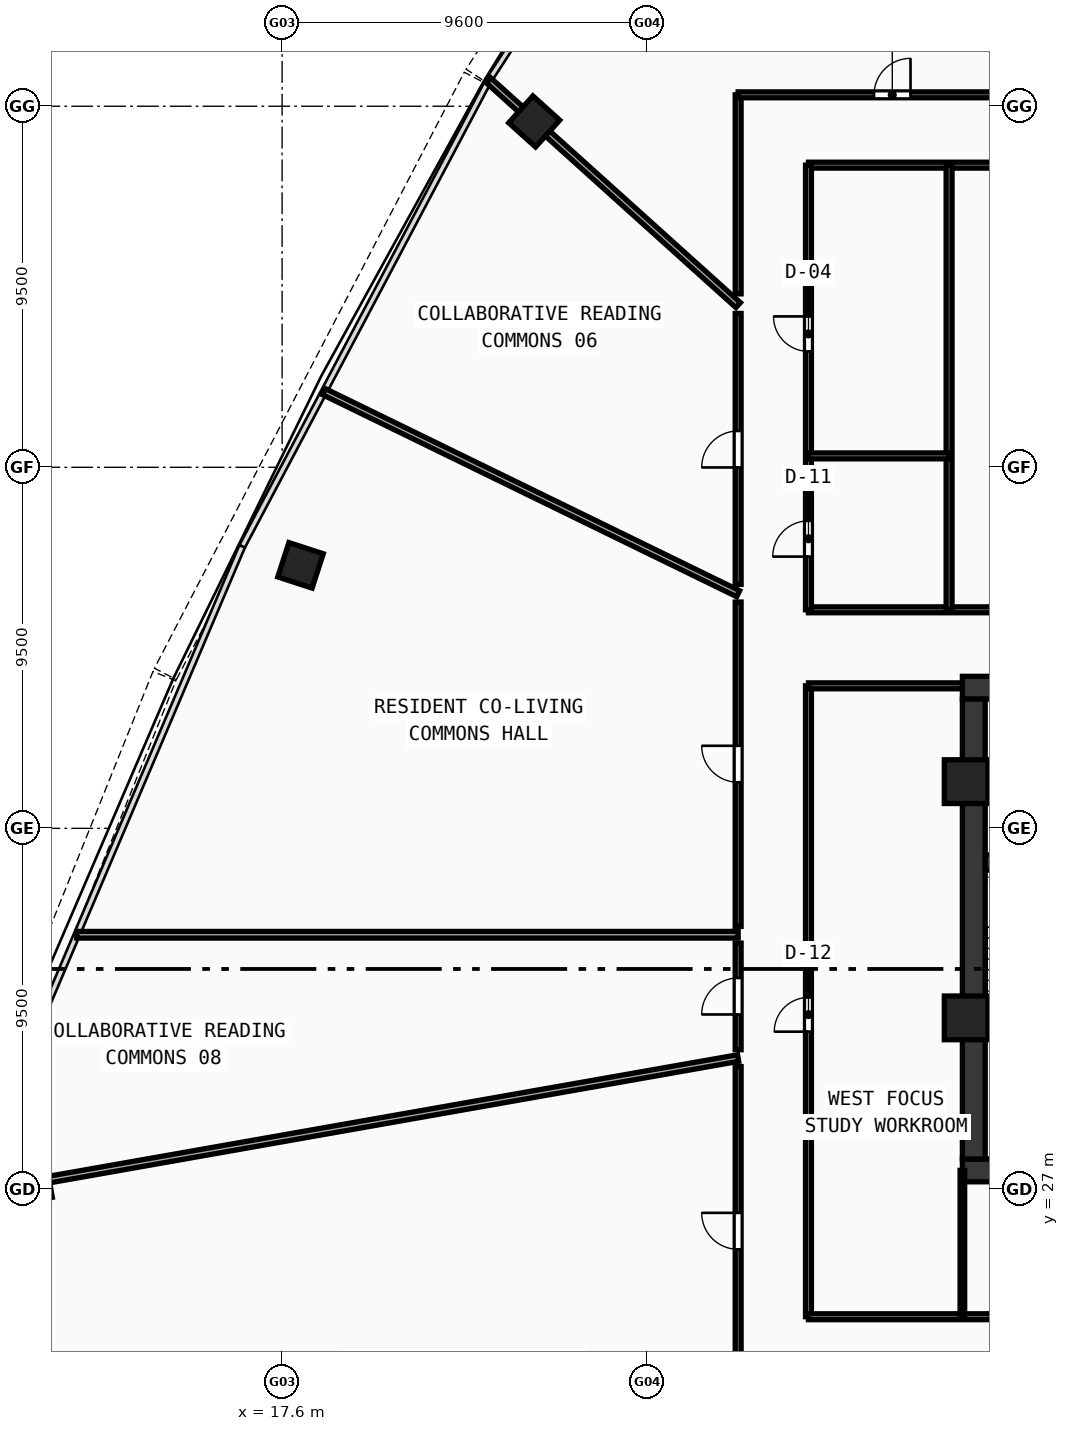
"""IFC4 building model, lengths in metres.
Left out: names, types, materials, properties, quantities, classifications, styles, units other than length and angle.
Written with IfcOpenShell. Run it as: python <this file> out.ifc"""

import sys

from ifc_helpers import new_model, si_unit, direction, frame, frame_2d, origin, origin_with_axes, origin_2d, place, context, subcontext, project, spatial, rectangle, hollow_rectangle, extrude, source, transform, mapped, element, fill, save


model = new_model("IFC4")
c1 = context("Model", 3, precision=1e-05, world=origin(), true_north=direction((0.0, 1.0)))
c2 = subcontext(c1, "Body", "Model", "MODEL_VIEW")
j1 = project(units=[si_unit("LENGTHUNIT", "METRE"), si_unit("PLANEANGLEUNIT", "RADIAN")], contexts=[c1])
p1 = place(None, origin())
s1 = spatial("IfcSite", under=j1, at=p1, CompositionType="ELEMENT")
p2 = place(p1, origin())
s2 = spatial("IfcBuilding", under=s1, at=p2, CompositionType="ELEMENT")
p3 = place(p2, frame((0.0, 0.0, 140.87)))
s3 = spatial("IfcBuildingStorey", under=s2, at=p3, CompositionType="ELEMENT", Elevation=140.87)
p4 = place(p3, frame((35.5, 27.5, 0.0), z_axis=(0.0, 0.0, 1.0), x_axis=(1.0, 0.0, 0.0)))
e1 = element("IfcWall", 1, at=p4, inside=s3, PredefinedType="SHEAR", context=c2, shape_type="SweptSolid", body=[
    extrude(rectangle(XDim=25.0, YDim=0.6, at=frame_2d((12.5, 0.0))), origin(), (0.0, 0.0, 1.0), 3.42),
])
p5 = place(p3, frame((35.5, 40.2, 0.0), z_axis=(0.0, 0.0, 1.0), x_axis=(1.0, 0.0, 0.0)))
e2 = element("IfcWall", 2, at=p5, inside=s3, PredefinedType="SHEAR", context=c2, shape_type="SweptSolid", body=[
    extrude(rectangle(XDim=11.3, YDim=0.6, at=frame_2d((5.65, 0.0))), origin(), (0.0, 0.0, 1.0), 3.42),
])
p6 = place(p5, frame((1.65, 0.0, 0.0)))
e3 = element("IfcOpeningElement", 3, at=p6, cuts=e2, PredefinedType="OPENING", context=c2, shape_type="SweptSolid", body=[
    extrude(rectangle(XDim=1.05, YDim=2.1, at=frame_2d((0.525, 1.05))), frame((0.0, 0.31, 0.0), z_axis=(0.0, -1.0, 0.0), x_axis=(1.0, 0.0, 0.0)), (0.0, 0.0, 1.0), 0.62),
])
p7 = place(p3, frame((35.8, 27.8, 0.0), z_axis=(0.0, 0.0, 1.0), x_axis=(0.0, 1.0, 0.0)))
e4 = element("IfcWall", 4, at=p7, inside=s3, PredefinedType="SHEAR", context=c2, shape_type="SweptSolid", body=[
    extrude(rectangle(XDim=12.1, YDim=0.6, at=frame_2d((6.05, 0.0))), origin(), (0.0, 0.0, 1.0), 3.42),
])
p8 = place(p3, frame((36.1, 35.6, 0.0), z_axis=(0.0, 0.0, 1.0), x_axis=(1.0, 0.0, 0.0)))
e5 = element("IfcWall", 5, at=p8, inside=s3, PredefinedType="SHEAR", context=c2, shape_type="SweptSolid", body=[
    extrude(rectangle(XDim=3.1, YDim=0.4, at=frame_2d((1.55, 0.0))), origin(), (0.0, 0.0, 1.0), 3.42),
])
p9 = place(p8, frame((1.02, 0.0, 0.0)))
e6 = element("IfcOpeningElement", 6, at=p9, cuts=e5, PredefinedType="OPENING", context=c2, shape_type="SweptSolid", body=[
    extrude(rectangle(XDim=1.05, YDim=2.1, at=frame_2d((0.525, 1.05))), frame((0.0, 0.21, 0.0), z_axis=(0.0, -1.0, 0.0), x_axis=(1.0, 0.0, 0.0)), (0.0, 0.0, 1.0), 0.42),
])
m1 = source(origin(), c2, "Body", "SweptSolid", [
    extrude(hollow_rectangle(XDim=1.15, YDim=1.15, WallThickness=0.048, at=origin_2d()), origin(), (0.0, 0.0, 1.0), 3.68),
])
for number, where, z_axis, x_axis in (
    (7, (35.6, 37.729, -0.26), (0.0, 0.0, 1.0), (1.0, 0.0, 0.0)),
    (8, (35.6, 31.513, -0.26), (0.0, 0.0, 1.0), (1.0, 0.0, 0.0)),
):
    element("IfcColumn", number, at=place(p3, frame(where, z_axis=z_axis, x_axis=x_axis)), inside=s3, PredefinedType="COLUMN", context=c2, shape_type="MappedRepresentation", body=[
        mapped(m1, transform((0.0, 0.0, 0.0), scale=1.0)),
    ])
m2 = source(origin(), c2, "Body", "SweptSolid", [
    extrude(hollow_rectangle(XDim=0.95, YDim=0.95, WallThickness=0.04, at=origin_2d()), origin(), (0.0, 0.0, 1.0), 3.68),
])
for number, where, z_axis, x_axis in (
    (9, (24.234, 55.099, -0.26), (0.0, 0.0, 1.0), (-0.669, -0.743, 0.0)),
    (10, (18.085, 43.42, -0.26), (0.0, 0.0, 1.0), (-0.309, -0.951, 0.0)),
    (11, (11.003, 27.177, -0.26), (0.0, 0.0, 1.0), (0.174, -0.985, 0.0)),
):
    element("IfcColumn", number, at=place(p3, frame(where, z_axis=z_axis, x_axis=x_axis)), inside=s3, PredefinedType="COLUMN", context=c2, shape_type="MappedRepresentation", body=[
        mapped(m2, transform((0.0, 0.0, 0.0), scale=1.0)),
    ])
p10 = place(p3, frame((8.102, 24.038, 0.0), z_axis=(0.0, 0.0, 1.0), x_axis=(0.497915888941, -0.867225326856, 0.0)))
e12 = element("IfcWall", 12, at=p10, inside=s3, PredefinedType="STANDARD", context=c2, shape_type="SweptSolid", body=[
    extrude(rectangle(XDim=8.858, YDim=0.26, at=frame_2d((4.429, 0.0))), origin(), (0.0, 0.0, 1.0), 3.42),
])
p11 = place(p10, frame((3.529, 0.0, 0.0)))
e13 = element("IfcOpeningElement", 13, at=p11, cuts=e12, PredefinedType="OPENING", context=c2, shape_type="SweptSolid", body=[
    extrude(rectangle(XDim=1.8, YDim=2.15, at=frame_2d((0.9, 1.075))), frame((0.0, 0.14, 0.0), z_axis=(0.0, -1.0, 0.0), x_axis=(1.0, 0.0, 0.0)), (0.0, 0.0, 1.0), 0.28),
])
p12 = place(p3, frame((31.45, 42.25, 0.0), z_axis=(0.0, 0.0, 1.0), x_axis=(1.0, 0.0, 0.0)))
e14 = element("IfcWall", 14, at=p12, inside=s3, PredefinedType="PARTITIONING", context=c2, shape_type="SweptSolid", body=[
    extrude(rectangle(XDim=33.1, YDim=0.155, at=frame_2d((16.55, 0.0))), origin(), (0.0, 0.0, 1.0), 2.77),
])
p13 = place(p3, frame((31.45, 53.95, 0.0), z_axis=(0.0, 0.0, 1.0), x_axis=(1.0, 0.0, 0.0)))
e15 = element("IfcWall", 15, at=p13, inside=s3, PredefinedType="PARTITIONING", context=c2, shape_type="SweptSolid", body=[
    extrude(rectangle(XDim=33.1, YDim=0.155, at=frame_2d((16.55, 0.0))), origin(), (0.0, 0.0, 1.0), 2.77),
])
p14 = place(p13, frame((8.0, 0.0, 0.0)))
e16 = element("IfcOpeningElement", 16, at=p14, cuts=e15, PredefinedType="OPENING", context=c2, shape_type="SweptSolid", body=[
    extrude(rectangle(XDim=0.92, YDim=2.1, at=frame_2d((0.46, 1.05))), frame((0.0, 0.087, 0.0), z_axis=(0.0, -1.0, 0.0), x_axis=(1.0, 0.0, 0.0)), (0.0, 0.0, 1.0), 0.175),
])
p15 = place(p13, frame((25.05, 0.0, 0.0)))
e17 = element("IfcOpeningElement", 17, at=p15, cuts=e15, PredefinedType="OPENING", context=c2, shape_type="SweptSolid", body=[
    extrude(rectangle(XDim=0.92, YDim=2.1, at=frame_2d((0.46, 1.05))), frame((0.0, 0.087, 0.0), z_axis=(0.0, -1.0, 0.0), x_axis=(1.0, 0.0, 0.0)), (0.0, 0.0, 1.0), 0.175),
])
p16 = place(p3, frame((31.45, 42.25, 0.0), z_axis=(0.0, 0.0, 1.0), x_axis=(0.0, 1.0, 0.0)))
e18 = element("IfcWall", 18, at=p16, inside=s3, PredefinedType="PARTITIONING", context=c2, shape_type="SweptSolid", body=[
    extrude(rectangle(XDim=11.7, YDim=0.155, at=frame_2d((5.85, 0.0))), origin(), (0.0, 0.0, 1.0), 2.77),
])
p17 = place(p16, frame((1.4, 0.0, 0.0)))
e19 = element("IfcOpeningElement", 19, at=p17, cuts=e18, PredefinedType="OPENING", context=c2, shape_type="SweptSolid", body=[
    extrude(rectangle(XDim=0.94, YDim=2.1, at=frame_2d((0.47, 1.05))), frame((0.0, 0.087, 0.0), z_axis=(0.0, -1.0, 0.0), x_axis=(1.0, 0.0, 0.0)), (0.0, 0.0, 1.0), 0.175),
])
p18 = place(p16, frame((6.8, 0.0, 0.0)))
e20 = element("IfcOpeningElement", 20, at=p18, cuts=e18, PredefinedType="OPENING", context=c2, shape_type="SweptSolid", body=[
    extrude(rectangle(XDim=0.92, YDim=2.1, at=frame_2d((0.46, 1.05))), frame((0.0, 0.087, 0.0), z_axis=(0.0, -1.0, 0.0), x_axis=(1.0, 0.0, 0.0)), (0.0, 0.0, 1.0), 0.175),
])
p19 = place(p3, frame((35.15, 42.25, 0.0), z_axis=(0.0, 0.0, 1.0), x_axis=(0.0, 1.0, 0.0)))
e21 = element("IfcWall", 21, at=p19, inside=s3, PredefinedType="PARTITIONING", context=c2, shape_type="SweptSolid", body=[
    extrude(rectangle(XDim=11.7, YDim=0.155, at=frame_2d((5.85, 0.0))), origin(), (0.0, 0.0, 1.0), 2.77),
])
p20 = place(p3, frame((31.45, 46.3, 0.0), z_axis=(0.0, 0.0, 1.0), x_axis=(1.0, 0.0, 0.0)))
e22 = element("IfcWall", 22, at=p20, inside=s3, PredefinedType="PARTITIONING", context=c2, shape_type="SweptSolid", body=[
    extrude(rectangle(XDim=3.7, YDim=0.155, at=frame_2d((1.85, 0.0))), origin(), (0.0, 0.0, 1.0), 2.77),
])
p21 = place(p3, frame((31.45, 23.65, 0.0), z_axis=(0.0, 0.0, 1.0), x_axis=(0.0, 1.0, 0.0)))
e23 = element("IfcWall", 23, at=p21, inside=s3, PredefinedType="PARTITIONING", context=c2, shape_type="SweptSolid", body=[
    extrude(rectangle(XDim=16.6, YDim=0.155, at=frame_2d((8.3, 0.0))), origin(), (0.0, 0.0, 1.0), 2.77),
])
p22 = place(p21, frame((7.5, 0.0, 0.0)))
e24 = element("IfcOpeningElement", 24, at=p22, cuts=e23, PredefinedType="OPENING", context=c2, shape_type="SweptSolid", body=[
    extrude(rectangle(XDim=0.9, YDim=2.08, at=frame_2d((0.45, 1.04))), frame((0.0, 0.087, 0.0), z_axis=(0.0, -1.0, 0.0), x_axis=(1.0, 0.0, 0.0)), (0.0, 0.0, 1.0), 0.175),
])
p23 = place(p3, frame((31.45, 23.65, 0.0), z_axis=(0.0, 0.0, 1.0), x_axis=(1.0, 0.0, 0.0)))
e25 = element("IfcWall", 25, at=p23, inside=s3, PredefinedType="PARTITIONING", context=c2, shape_type="SweptSolid", body=[
    extrude(rectangle(XDim=33.1, YDim=0.155, at=frame_2d((16.55, 0.0))), origin(), (0.0, 0.0, 1.0), 2.77),
])
p24 = place(p23, frame((16.0, 0.0, 0.0)))
e26 = element("IfcOpeningElement", 26, at=p24, cuts=e25, PredefinedType="OPENING", context=c2, shape_type="SweptSolid", body=[
    extrude(rectangle(XDim=0.92, YDim=2.1, at=frame_2d((0.46, 1.05))), frame((0.0, 0.087, 0.0), z_axis=(0.0, -1.0, 0.0), x_axis=(1.0, 0.0, 0.0)), (0.0, 0.0, 1.0), 0.175),
])
p25 = place(p3, frame((31.45, 40.25, 0.0), z_axis=(0.0, 0.0, 1.0), x_axis=(1.0, 0.0, 0.0)))
e27 = element("IfcWall", 27, at=p25, inside=s3, PredefinedType="PARTITIONING", context=c2, shape_type="SweptSolid", body=[
    extrude(rectangle(XDim=4.05, YDim=0.155, at=frame_2d((2.025, 0.0))), origin(), (0.0, 0.0, 1.0), 3.42),
])
p26 = place(p3, frame((35.5, 23.65, 0.0), z_axis=(0.0, 0.0, 1.0), x_axis=(0.0, 1.0, 0.0)))
e28 = element("IfcWall", 28, at=p26, inside=s3, PredefinedType="PARTITIONING", context=c2, shape_type="SweptSolid", body=[
    extrude(rectangle(XDim=3.85, YDim=0.12, at=frame_2d((1.925, 0.0))), origin(), (0.0, 0.0, 1.0), 3.02),
])
p27 = place(p3, frame((38.16, 55.8, 0.0), z_axis=(0.0, 0.0, 1.0), x_axis=(-0.406735812773, 0.913545827317, 0.0)))
e29 = element("IfcWall", 29, at=p27, inside=s3, PredefinedType="PARTITIONING", context=c2, shape_type="SweptSolid", body=[
    extrude(rectangle(XDim=15.394, YDim=0.175, at=frame_2d((7.697, 0.0))), origin(), (0.0, 0.0, 1.0), 2.77),
])
p28 = place(p3, frame((29.6, 50.267, 0.0), z_axis=(0.0, 0.0, 1.0), x_axis=(-0.743144335498, 0.669131150535, 0.0)))
e30 = element("IfcWall", 30, at=p28, inside=s3, PredefinedType="PARTITIONING", context=c2, shape_type="SweptSolid", body=[
    extrude(rectangle(XDim=8.834, YDim=0.175, at=frame_2d((4.417, 0.0))), origin(), (0.0, 0.0, 1.0), 2.77),
])
p29 = place(p3, frame((29.6, 42.674, 0.0), z_axis=(0.0, 0.0, 1.0), x_axis=(-0.898797277455, 0.438364521875, 0.0)))
e31 = element("IfcWall", 31, at=p29, inside=s3, PredefinedType="PARTITIONING", context=c2, shape_type="SweptSolid", body=[
    extrude(rectangle(XDim=12.125, YDim=0.175, at=frame_2d((6.062, 0.0))), origin(), (0.0, 0.0, 1.0), 2.77),
])
p30 = place(p3, frame((29.6, 33.7, 0.0), z_axis=(0.0, 0.0, 1.0), x_axis=(-1.0, 0.0, 0.0)))
e32 = element("IfcWall", 32, at=p30, inside=s3, PredefinedType="PARTITIONING", context=c2, shape_type="SweptSolid", body=[
    extrude(rectangle(XDim=17.403, YDim=0.175, at=frame_2d((8.702, 0.0))), origin(), (0.0, 0.0, 1.0), 2.77),
])
p31 = place(p3, frame((29.6, 30.456, 0.0), z_axis=(0.0, 0.0, 1.0), x_axis=(-0.984807623882, -0.173648909998, 0.0)))
e33 = element("IfcWall", 33, at=p31, inside=s3, PredefinedType="PARTITIONING", context=c2, shape_type="SweptSolid", body=[
    extrude(rectangle(XDim=20.622, YDim=0.175, at=frame_2d((10.311, 0.0))), origin(), (0.0, 0.0, 1.0), 2.77),
])
p32 = place(p3, frame((29.6, 21.8, 0.0), z_axis=(0.0, 0.0, 1.0), x_axis=(0.0, 1.0, 0.0)))
e34 = element("IfcWall", 34, at=p32, inside=s3, PredefinedType="PARTITIONING", context=c2, shape_type="SweptSolid", body=[
    extrude(rectangle(XDim=8.432, YDim=0.155, at=frame_2d((4.216, 0.0))), origin(), (0.0, 0.0, 1.0), 3.02),
])
p33 = place(p32, frame((3.623, 0.0, 0.0)))
e35 = element("IfcOpeningElement", 35, at=p33, cuts=e34, PredefinedType="OPENING", context=c2, shape_type="SweptSolid", body=[
    extrude(rectangle(XDim=0.96, YDim=2.12, at=frame_2d((0.48, 1.06))), frame((0.0, 0.087, 0.0), z_axis=(0.0, -1.0, 0.0), x_axis=(1.0, 0.0, 0.0)), (0.0, 0.0, 1.0), 0.175),
])
p34 = place(p3, frame((29.6, 30.675, 0.0), z_axis=(0.0, 0.0, 1.0), x_axis=(0.0, 1.0, 0.0)))
e36 = element("IfcWall", 36, at=p34, inside=s3, PredefinedType="PARTITIONING", context=c2, shape_type="SweptSolid", body=[
    extrude(rectangle(XDim=2.805, YDim=0.155, at=frame_2d((1.402, 0.0))), origin(), (0.0, 0.0, 1.0), 3.42),
])
p35 = place(p34, frame((0.927, 0.0, 0.0)))
e37 = element("IfcOpeningElement", 37, at=p35, cuts=e36, PredefinedType="OPENING", context=c2, shape_type="SweptSolid", body=[
    extrude(rectangle(XDim=0.96, YDim=2.12, at=frame_2d((0.48, 1.06))), frame((0.0, 0.087, 0.0), z_axis=(0.0, -1.0, 0.0), x_axis=(1.0, 0.0, 0.0)), (0.0, 0.0, 1.0), 0.175),
])
p36 = place(p3, frame((29.6, 33.92, 0.0), z_axis=(0.0, 0.0, 1.0), x_axis=(0.0, 1.0, 0.0)))
e38 = element("IfcWall", 38, at=p36, inside=s3, PredefinedType="PARTITIONING", context=c2, shape_type="SweptSolid", body=[
    extrude(rectangle(XDim=8.535, YDim=0.155, at=frame_2d((4.267, 0.0))), origin(), (0.0, 0.0, 1.0), 2.77),
])
p37 = place(p36, frame((3.792, 0.0, 0.0)))
e39 = element("IfcOpeningElement", 39, at=p37, cuts=e38, PredefinedType="OPENING", context=c2, shape_type="SweptSolid", body=[
    extrude(rectangle(XDim=0.96, YDim=2.12, at=frame_2d((0.48, 1.06))), frame((0.0, 0.087, 0.0), z_axis=(0.0, -1.0, 0.0), x_axis=(1.0, 0.0, 0.0)), (0.0, 0.0, 1.0), 0.175),
])
p38 = place(p3, frame((29.6, 42.919, 0.0), z_axis=(0.0, 0.0, 1.0), x_axis=(0.0, 1.0, 0.0)))
e40 = element("IfcWall", 40, at=p38, inside=s3, PredefinedType="PARTITIONING", context=c2, shape_type="SweptSolid", body=[
    extrude(rectangle(XDim=7.128, YDim=0.155, at=frame_2d((3.564, 0.0))), origin(), (0.0, 0.0, 1.0), 2.77),
])
p39 = place(p38, frame((3.077, 0.0, 0.0)))
e41 = element("IfcOpeningElement", 41, at=p39, cuts=e40, PredefinedType="OPENING", context=c2, shape_type="SweptSolid", body=[
    extrude(rectangle(XDim=0.96, YDim=2.12, at=frame_2d((0.48, 1.06))), frame((0.0, 0.087, 0.0), z_axis=(0.0, -1.0, 0.0), x_axis=(1.0, 0.0, 0.0)), (0.0, 0.0, 1.0), 0.175),
])
p40 = place(p3, frame((29.6, 50.563, 0.0), z_axis=(0.0, 0.0, 1.0), x_axis=(0.0, 1.0, 0.0)))
e42 = element("IfcWall", 42, at=p40, inside=s3, PredefinedType="PARTITIONING", context=c2, shape_type="SweptSolid", body=[
    extrude(rectangle(XDim=5.237, YDim=0.155, at=frame_2d((2.618, 0.0))), origin(), (0.0, 0.0, 1.0), 3.02),
])
p41 = place(p3, frame((29.6, 55.8, 0.0), z_axis=(0.0, 0.0, 1.0), x_axis=(1.0, 0.0, 0.0)))
e43 = element("IfcWall", 43, at=p41, inside=s3, PredefinedType="PARTITIONING", context=c2, shape_type="SweptSolid", body=[
    extrude(rectangle(XDim=8.32, YDim=0.155, at=frame_2d((4.16, 0.0))), origin(), (0.0, 0.0, 1.0), 3.02),
])
p42 = place(p41, frame((3.575, 0.0, 0.0)))
e44 = element("IfcOpeningElement", 44, at=p42, cuts=e43, PredefinedType="OPENING", context=c2, shape_type="SweptSolid", body=[
    extrude(rectangle(XDim=0.96, YDim=2.12, at=frame_2d((0.48, 1.06))), frame((0.0, 0.087, 0.0), z_axis=(0.0, -1.0, 0.0), x_axis=(1.0, 0.0, 0.0)), (0.0, 0.0, 1.0), 0.175),
])
m3 = source(origin(), c2, "Body", "SweptSolid", [
    extrude(rectangle(XDim=0.94, YDim=2.1, at=frame_2d((0.47, 1.05))), frame((0.0, 0.025, 0.0), z_axis=(0.0, -1.0, 0.0), x_axis=(1.0, 0.0, 0.0)), (0.0, 0.0, 1.0), 0.05),
])
p43 = place(p17, origin_with_axes())
e45 = element("IfcDoor", 45, at=p43, inside=s3, OperationType="SINGLE_SWING_LEFT", PredefinedType="DOOR", context=c2, shape_type="MappedRepresentation", body=[
    mapped(m3, transform((0.0, 0.0, 0.0), scale=1.0)),
])
fill(e19, e45)
m4 = source(origin(), c2, "Body", "SweptSolid", [
    extrude(rectangle(XDim=0.92, YDim=2.1, at=frame_2d((0.46, 1.05))), frame((0.0, 0.025, 0.0), z_axis=(0.0, -1.0, 0.0), x_axis=(1.0, 0.0, 0.0)), (0.0, 0.0, 1.0), 0.05),
])
p44 = place(p18, origin_with_axes())
e46 = element("IfcDoor", 46, at=p44, inside=s3, OperationType="SINGLE_SWING_RIGHT", PredefinedType="DOOR", context=c2, shape_type="MappedRepresentation", body=[
    mapped(m4, transform((0.0, 0.0, 0.0), scale=1.0)),
])
fill(e20, e46)
m5 = source(origin(), c2, "Body", "SweptSolid", [
    extrude(rectangle(XDim=0.9, YDim=2.08, at=frame_2d((0.45, 1.04))), frame((0.0, 0.025, 0.0), z_axis=(0.0, -1.0, 0.0), x_axis=(1.0, 0.0, 0.0)), (0.0, 0.0, 1.0), 0.05),
])
p45 = place(p22, origin_with_axes())
e47 = element("IfcDoor", 47, at=p45, inside=s3, OperationType="SINGLE_SWING_LEFT", PredefinedType="DOOR", context=c2, shape_type="MappedRepresentation", body=[
    mapped(m5, transform((0.0, 0.0, 0.0), scale=1.0)),
])
fill(e24, e47)
m6 = source(origin(), c2, "Body", "SweptSolid", [
    extrude(rectangle(XDim=0.96, YDim=2.12, at=frame_2d((0.48, 1.06))), frame((0.0, 0.025, 0.0), z_axis=(0.0, -1.0, 0.0), x_axis=(1.0, 0.0, 0.0)), (0.0, 0.0, 1.0), 0.05),
])
p46 = place(p42, origin_with_axes())
e48 = element("IfcDoor", 48, at=p46, inside=s3, OperationType="SINGLE_SWING_RIGHT", PredefinedType="DOOR", context=c2, shape_type="MappedRepresentation", body=[
    mapped(m6, transform((0.0, 0.0, 0.0), scale=1.0)),
])
fill(e44, e48)
p47 = place(p39, origin_with_axes())
e49 = element("IfcDoor", 49, at=p47, inside=s3, OperationType="SINGLE_SWING_LEFT", PredefinedType="DOOR", context=c2, shape_type="MappedRepresentation", body=[
    mapped(m6, transform((0.0, 0.0, 0.0), scale=1.0)),
])
fill(e41, e49)
p48 = place(p37, origin_with_axes())
e50 = element("IfcDoor", 50, at=p48, inside=s3, OperationType="SINGLE_SWING_RIGHT", PredefinedType="DOOR", context=c2, shape_type="MappedRepresentation", body=[
    mapped(m6, transform((0.0, 0.0, 0.0), scale=1.0)),
])
fill(e39, e50)
p49 = place(p35, origin_with_axes())
e51 = element("IfcDoor", 51, at=p49, inside=s3, OperationType="SINGLE_SWING_LEFT", PredefinedType="DOOR", context=c2, shape_type="MappedRepresentation", body=[
    mapped(m6, transform((0.0, 0.0, 0.0), scale=1.0)),
])
fill(e37, e51)
p50 = place(p33, origin_with_axes())
e52 = element("IfcDoor", 52, at=p50, inside=s3, OperationType="SINGLE_SWING_RIGHT", PredefinedType="DOOR", context=c2, shape_type="MappedRepresentation", body=[
    mapped(m6, transform((0.0, 0.0, 0.0), scale=1.0)),
])
fill(e35, e52)
save(model, sys.argv[1])
